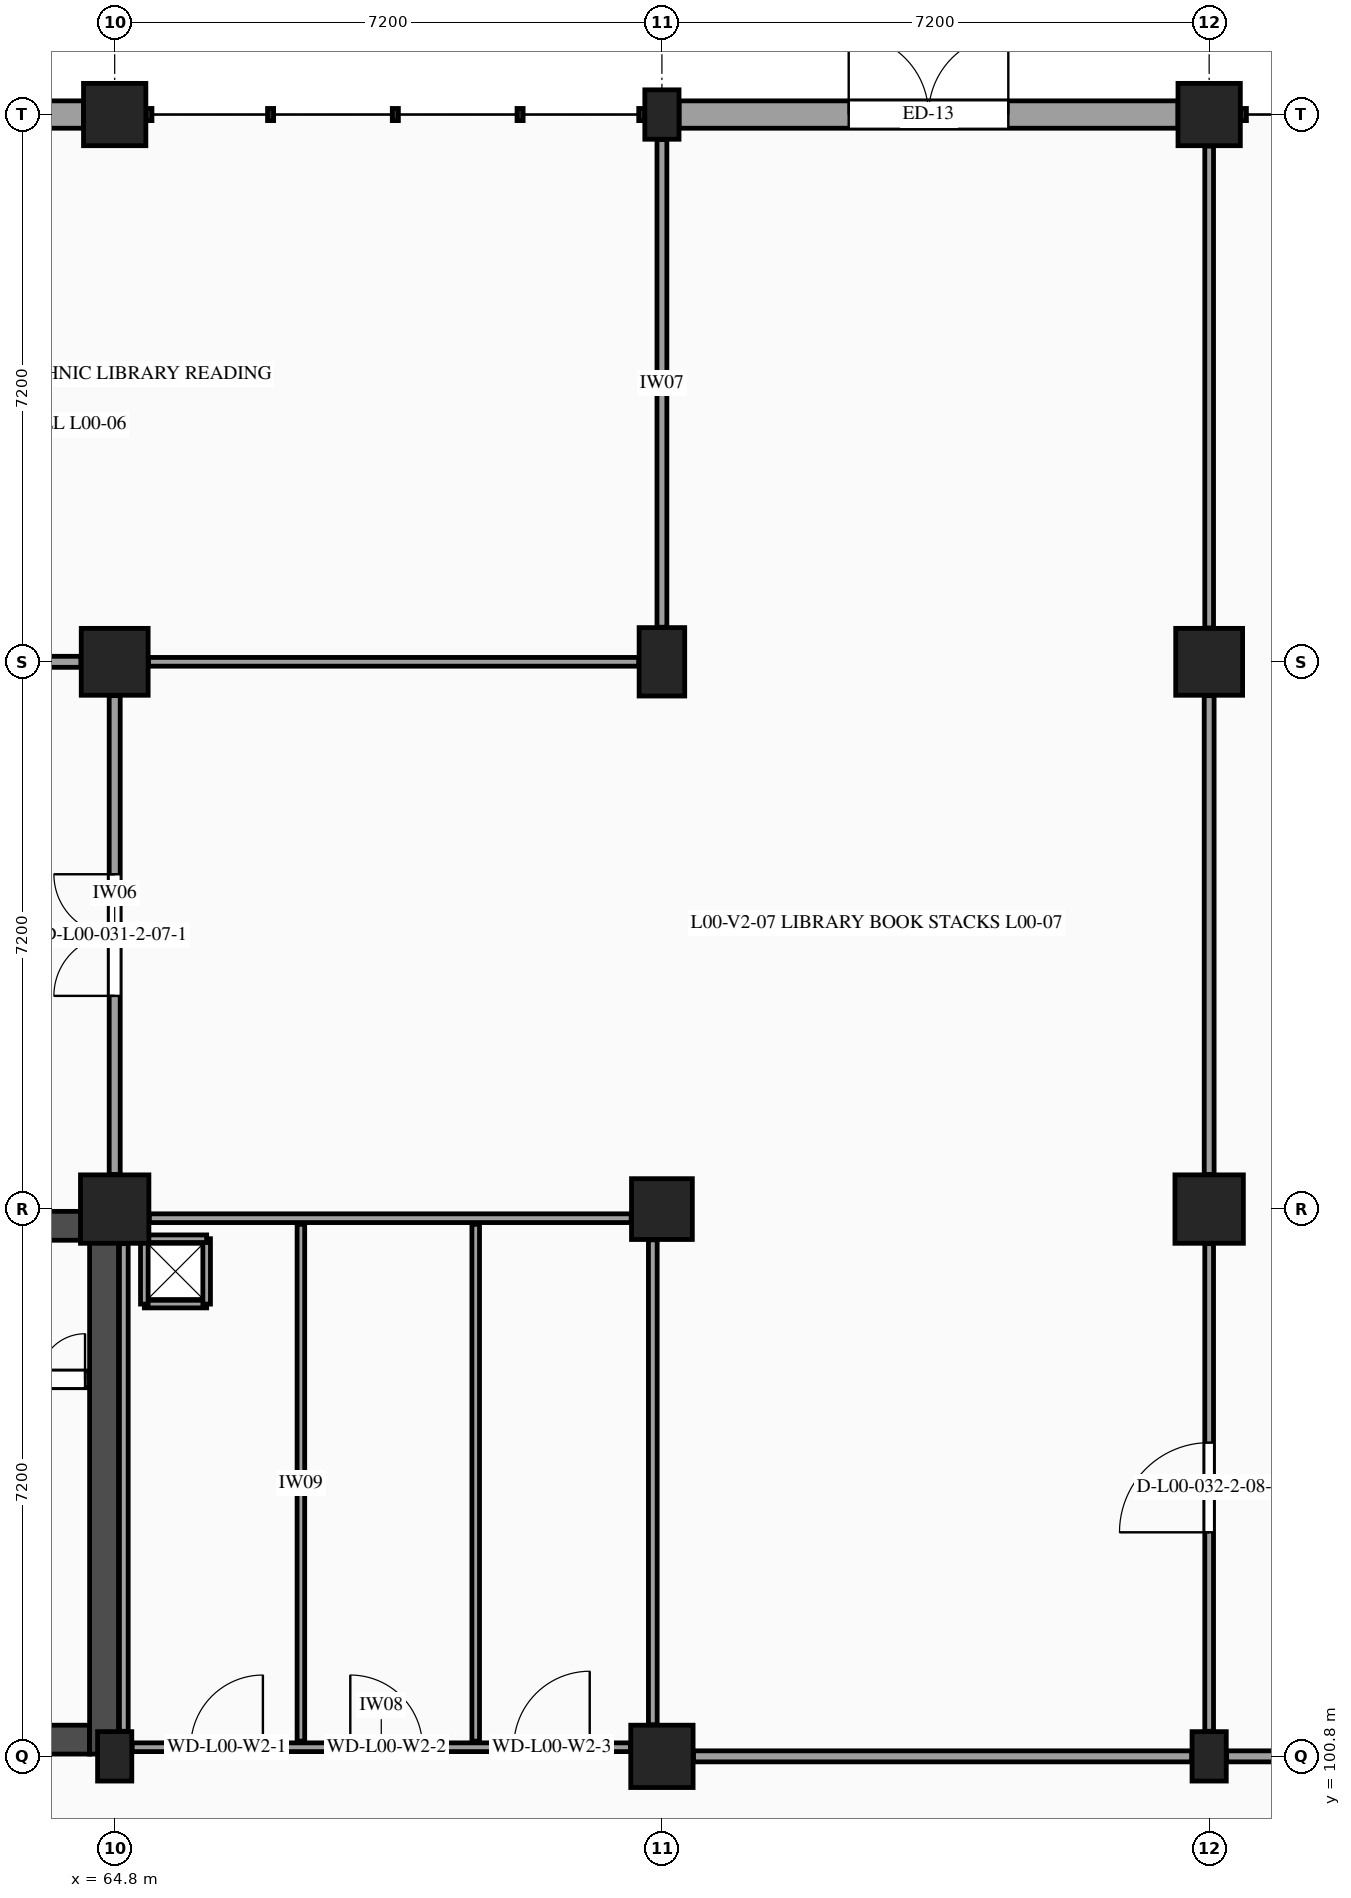
"""IFC4 building model, lengths in metres.
Left out: names, types, materials, properties, quantities, classifications, styles, units other than length and angle.
Written with IfcOpenShell. Run it as: python <this file> out.ifc"""

import sys

from ifc_helpers import new_model, si_unit, direction, frame, frame_2d, origin, origin_2d, place, context, subcontext, project, spatial, rectangle, extrude, element, fill, save


model = new_model("IFC4")
c1 = context("Model", 3, precision=1e-05, world=origin(), true_north=direction((0.0, 1.0)))
c2 = subcontext(c1, "Body", "Model", "MODEL_VIEW")
j1 = project(units=[si_unit("LENGTHUNIT", "METRE"), si_unit("PLANEANGLEUNIT", "RADIAN")], contexts=[c1])
p1 = place(None, origin())
s1 = spatial("IfcSite", under=j1, at=p1, CompositionType="ELEMENT")
p2 = place(p1, origin())
s2 = spatial("IfcBuilding", under=s1, at=p2, CompositionType="ELEMENT")
p3 = place(p2, origin())
s3 = spatial("IfcBuildingStorey", under=s2, at=p3, CompositionType="ELEMENT", Elevation=0.0)
p4 = place(p3, frame((64.8, 100.8, 0.0), z_axis=(0.0, 0.0, 1.0), x_axis=(1.0, 0.0, 0.0)))
e1 = element("IfcColumn", 1, at=p4, inside=s3, PredefinedType="PILASTER", context=c2, shape_type="SweptSolid", body=[
    extrude(rectangle(XDim=0.45, YDim=0.65, at=origin_2d()), origin(), (0.0, 0.0, 1.0), 5.4),
])
p5 = place(p3, frame((64.8, 108.0, 0.0), z_axis=(0.0, 0.0, 1.0), x_axis=(1.0, 0.0, 0.0)))
e2 = element("IfcColumn", 2, at=p5, inside=s3, PredefinedType="COLUMN", context=c2, shape_type="SweptSolid", body=[
    extrude(rectangle(XDim=0.9, YDim=0.9, at=origin_2d()), origin(), (0.0, 0.0, 1.0), 5.4),
])
p6 = place(p3, frame((64.8, 115.2, 0.0), z_axis=(0.0, 0.0, 1.0), x_axis=(1.0, 0.0, 0.0)))
e3 = element("IfcColumn", 3, at=p6, inside=s3, PredefinedType="COLUMN", context=c2, shape_type="SweptSolid", body=[
    extrude(rectangle(XDim=0.88, YDim=0.88, at=origin_2d()), origin(), (0.0, 0.0, 1.0), 5.4),
])
for number, where, z_axis, x_axis in (
    (4, (64.8, 122.4, 0.0), (0.0, 0.0, 1.0), (1.0, 0.0, 0.0)),
    (5, (72.0, 100.8, 0.0), (0.0, 0.0, 1.0), (1.0, 0.0, 0.0)),
):
    element("IfcColumn", number, at=place(p3, frame(where, z_axis=z_axis, x_axis=x_axis)), inside=s3, PredefinedType="COLUMN", context=c2, shape_type="SweptSolid", body=[
        extrude(rectangle(XDim=0.82, YDim=0.82, at=origin_2d()), origin(), (0.0, 0.0, 1.0), 5.4),
    ])
p7 = place(p3, frame((72.0, 108.0, 0.0), z_axis=(0.0, 0.0, 1.0), x_axis=(1.0, 0.0, 0.0)))
e6 = element("IfcColumn", 6, at=p7, inside=s3, PredefinedType="COLUMN", context=c2, shape_type="SweptSolid", body=[
    extrude(rectangle(XDim=0.8, YDim=0.8, at=origin_2d()), origin(), (0.0, 0.0, 1.0), 5.4),
])
p8 = place(p3, frame((72.0, 115.2, 0.0), z_axis=(0.0, 0.0, 1.0), x_axis=(1.0, 0.0, 0.0)))
e7 = element("IfcColumn", 7, at=p8, inside=s3, PredefinedType="COLUMN", context=c2, shape_type="SweptSolid", body=[
    extrude(rectangle(XDim=0.6, YDim=0.9, at=origin_2d()), origin(), (0.0, 0.0, 1.0), 5.4),
])
for number, where, z_axis, x_axis in (
    (8, (72.0, 122.4, 0.0), (0.0, 0.0, 1.0), (1.0, 0.0, 0.0)),
    (9, (79.2, 100.8, 0.0), (0.0, 0.0, 1.0), (1.0, 0.0, 0.0)),
):
    element("IfcColumn", number, at=place(p3, frame(where, z_axis=z_axis, x_axis=x_axis)), inside=s3, PredefinedType="PILASTER", context=c2, shape_type="SweptSolid", body=[
        extrude(rectangle(XDim=0.45, YDim=0.65, at=origin_2d()), origin(), (0.0, 0.0, 1.0), 5.4),
    ])
p9 = place(p3, frame((79.2, 108.0, 0.0), z_axis=(0.0, 0.0, 1.0), x_axis=(1.0, 0.0, 0.0)))
e10 = element("IfcColumn", 10, at=p9, inside=s3, PredefinedType="COLUMN", context=c2, shape_type="SweptSolid", body=[
    extrude(rectangle(XDim=0.9, YDim=0.9, at=origin_2d()), origin(), (0.0, 0.0, 1.0), 5.4),
])
p10 = place(p3, frame((79.2, 115.2, 0.0), z_axis=(0.0, 0.0, 1.0), x_axis=(1.0, 0.0, 0.0)))
e11 = element("IfcColumn", 11, at=p10, inside=s3, PredefinedType="COLUMN", context=c2, shape_type="SweptSolid", body=[
    extrude(rectangle(XDim=0.88, YDim=0.88, at=origin_2d()), origin(), (0.0, 0.0, 1.0), 5.4),
])
p11 = place(p3, frame((79.2, 122.4, 0.0), z_axis=(0.0, 0.0, 1.0), x_axis=(1.0, 0.0, 0.0)))
e12 = element("IfcColumn", 12, at=p11, inside=s3, PredefinedType="COLUMN", context=c2, shape_type="SweptSolid", body=[
    extrude(rectangle(XDim=0.82, YDim=0.82, at=origin_2d()), origin(), (0.0, 0.0, 1.0), 5.4),
])
p12 = place(p3, frame((57.825, 122.4, 0.0), z_axis=(0.0, 0.0, 1.0), x_axis=(1.0, 0.0, 0.0)))
e13 = element("IfcWall", 13, at=p12, inside=s3, PredefinedType="STANDARD", context=c2, shape_type="SweptSolid", body=[
    extrude(rectangle(XDim=6.565, YDim=0.36, at=frame_2d((3.282, 0.0))), origin(), (0.0, 0.0, 1.0), 4.37),
])
p13 = place(p12, frame((2.232, 0.0, 0.0)))
e14 = element("IfcOpeningElement", 14, at=p13, cuts=e13, PredefinedType="OPENING", context=c2, shape_type="SweptSolid", body=[
    extrude(rectangle(XDim=2.1, YDim=2.4, at=frame_2d((1.05, 1.2))), frame((0.0, 0.19, 0.0), z_axis=(0.0, -1.0, 0.0), x_axis=(1.0, 0.0, 0.0)), (0.0, 0.0, 1.0), 0.38),
])
p14 = place(p3, frame((72.225, 122.4, 0.0), z_axis=(0.0, 0.0, 1.0), x_axis=(1.0, 0.0, 0.0)))
e15 = element("IfcWall", 15, at=p14, inside=s3, PredefinedType="STANDARD", context=c2, shape_type="SweptSolid", body=[
    extrude(rectangle(XDim=6.565, YDim=0.36, at=frame_2d((3.282, 0.0))), origin(), (0.0, 0.0, 1.0), 4.37),
])
p15 = place(p14, frame((2.232, 0.0, 0.0)))
e16 = element("IfcOpeningElement", 16, at=p15, cuts=e15, PredefinedType="OPENING", context=c2, shape_type="SweptSolid", body=[
    extrude(rectangle(XDim=2.1, YDim=2.4, at=frame_2d((1.05, 1.2))), frame((0.0, 0.19, 0.0), z_axis=(0.0, -1.0, 0.0), x_axis=(1.0, 0.0, 0.0)), (0.0, 0.0, 1.0), 0.38),
])
p16 = place(p3, frame((58.01, 101.02, 0.0), z_axis=(0.0, 0.0, 1.0), x_axis=(1.0, 0.0, 0.0)))
e17 = element("IfcWall", 17, at=p16, inside=s3, PredefinedType="SHEAR", context=c2, shape_type="SweptSolid", body=[
    extrude(rectangle(XDim=6.46, YDim=0.38, at=frame_2d((3.23, 0.0))), origin(), (0.0, 0.0, 1.0), 5.09),
])
p17 = place(p3, frame((58.01, 107.78, 0.0), z_axis=(0.0, 0.0, 1.0), x_axis=(1.0, 0.0, 0.0)))
e18 = element("IfcWall", 18, at=p17, inside=s3, PredefinedType="SHEAR", context=c2, shape_type="SweptSolid", body=[
    extrude(rectangle(XDim=6.46, YDim=0.38, at=frame_2d((3.23, 0.0))), origin(), (0.0, 0.0, 1.0), 5.09),
])
p18 = place(p17, frame((1.42, 0.0, 0.0)))
e19 = element("IfcOpeningElement", 19, at=p18, cuts=e18, PredefinedType="OPENING", context=c2, shape_type="SweptSolid", body=[
    extrude(rectangle(XDim=0.85, YDim=2.1, at=frame_2d((0.425, 1.05))), frame((0.0, 0.2, 0.0), z_axis=(0.0, -1.0, 0.0), x_axis=(1.0, 0.0, 0.0)), (0.0, 0.0, 1.0), 0.4),
])
p19 = place(p17, frame((3.2, 0.0, 0.0)))
e20 = element("IfcOpeningElement", 20, at=p19, cuts=e18, PredefinedType="OPENING", context=c2, shape_type="SweptSolid", body=[
    extrude(rectangle(XDim=1.6, YDim=2.2, at=frame_2d((0.8, 1.1))), frame((0.0, 0.2, 0.0), z_axis=(0.0, -1.0, 0.0), x_axis=(1.0, 0.0, 0.0)), (0.0, 0.0, 1.0), 0.4),
])
p20 = place(p3, frame((58.01, 105.76, 0.0), z_axis=(0.0, 0.0, 1.0), x_axis=(1.0, 0.0, 0.0)))
e21 = element("IfcWall", 21, at=p20, inside=s3, PredefinedType="SHEAR", context=c2, shape_type="SweptSolid", body=[
    extrude(rectangle(XDim=6.46, YDim=0.22, at=frame_2d((3.23, 0.0))), origin(), (0.0, 0.0, 1.0), 5.09),
])
p21 = place(p20, frame((5.2, 0.0, 0.0)))
e22 = element("IfcOpeningElement", 22, at=p21, cuts=e21, PredefinedType="OPENING", context=c2, shape_type="SweptSolid", body=[
    extrude(rectangle(XDim=1.2, YDim=2.2, at=frame_2d((0.6, 1.1))), frame((0.0, 0.12, 0.0), z_axis=(0.0, -1.0, 0.0), x_axis=(1.0, 0.0, 0.0)), (0.0, 0.0, 1.0), 0.24),
])
p22 = place(p3, frame((64.66, 100.83, 0.0), z_axis=(0.0, 0.0, 1.0), x_axis=(0.0, 1.0, 0.0)))
e23 = element("IfcWall", 23, at=p22, inside=s3, PredefinedType="SHEAR", context=c2, shape_type="SweptSolid", body=[
    extrude(rectangle(XDim=7.14, YDim=0.38, at=frame_2d((3.57, 0.0))), origin(), (0.0, 0.0, 1.0), 5.09),
])
p23 = place(p3, frame((65.03, 100.92, 0.0), z_axis=(0.0, 0.0, 1.0), x_axis=(1.0, 0.0, 0.0)))
e24 = element("IfcWall", 24, at=p23, inside=s3, PredefinedType="PARTITIONING", context=c2, shape_type="SweptSolid", body=[
    extrude(rectangle(XDim=6.555, YDim=0.115, at=frame_2d((3.277, 0.0))), origin(), (0.0, 0.0, 1.0), 4.29),
])
p24 = place(p23, frame((0.77, 0.0, 0.0)))
e25 = element("IfcOpeningElement", 25, at=p24, cuts=e24, PredefinedType="OPENING", context=c2, shape_type="SweptSolid", body=[
    extrude(rectangle(XDim=0.95, YDim=2.1, at=frame_2d((0.475, 1.05))), frame((0.0, 0.067, 0.0), z_axis=(0.0, -1.0, 0.0), x_axis=(1.0, 0.0, 0.0)), (0.0, 0.0, 1.0), 0.135),
])
p25 = place(p23, frame((2.87, 0.0, 0.0)))
e26 = element("IfcOpeningElement", 26, at=p25, cuts=e24, PredefinedType="OPENING", context=c2, shape_type="SweptSolid", body=[
    extrude(rectangle(XDim=0.95, YDim=2.1, at=frame_2d((0.475, 1.05))), frame((0.0, 0.067, 0.0), z_axis=(0.0, -1.0, 0.0), x_axis=(1.0, 0.0, 0.0)), (0.0, 0.0, 1.0), 0.135),
])
p26 = place(p23, frame((5.02, 0.0, 0.0)))
e27 = element("IfcOpeningElement", 27, at=p26, cuts=e24, PredefinedType="OPENING", context=c2, shape_type="SweptSolid", body=[
    extrude(rectangle(XDim=1.0, YDim=2.15, at=frame_2d((0.5, 1.075))), frame((0.0, 0.067, 0.0), z_axis=(0.0, -1.0, 0.0), x_axis=(1.0, 0.0, 0.0)), (0.0, 0.0, 1.0), 0.135),
])
p27 = place(p3, frame((65.255, 107.88, 0.0), z_axis=(0.0, 0.0, 1.0), x_axis=(1.0, 0.0, 0.0)))
e28 = element("IfcWall", 28, at=p27, inside=s3, PredefinedType="PARTITIONING", context=c2, shape_type="SweptSolid", body=[
    extrude(rectangle(XDim=6.34, YDim=0.115, at=frame_2d((3.17, 0.0))), origin(), (0.0, 0.0, 1.0), 4.29),
])
p28 = place(p3, frame((64.92, 101.13, 0.0), z_axis=(0.0, 0.0, 1.0), x_axis=(0.0, 1.0, 0.0)))
e29 = element("IfcWall", 29, at=p28, inside=s3, PredefinedType="PARTITIONING", context=c2, shape_type="SweptSolid", body=[
    extrude(rectangle(XDim=6.415, YDim=0.115, at=frame_2d((3.208, 0.0))), origin(), (0.0, 0.0, 1.0), 4.455),
])
p29 = place(p3, frame((71.88, 101.215, 0.0), z_axis=(0.0, 0.0, 1.0), x_axis=(0.0, 1.0, 0.0)))
e30 = element("IfcWall", 30, at=p29, inside=s3, PredefinedType="PARTITIONING", context=c2, shape_type="SweptSolid", body=[
    extrude(rectangle(XDim=6.38, YDim=0.115, at=frame_2d((3.19, 0.0))), origin(), (0.0, 0.0, 1.0), 4.455),
])
for number, where, z_axis, x_axis in (
    (31, (67.25, 101.0, 0.0), (0.0, 0.0, 1.0), (0.0, 1.0, 0.0)),
    (32, (69.55, 101.0, 0.0), (0.0, 0.0, 1.0), (0.0, 1.0, 0.0)),
):
    element("IfcWall", number, at=place(p3, frame(where, z_axis=z_axis, x_axis=x_axis)), inside=s3, PredefinedType="PARTITIONING", context=c2, shape_type="SweptSolid", body=[
        extrude(rectangle(XDim=6.8, YDim=0.1, at=frame_2d((3.4, 0.0))), origin(), (0.0, 0.0, 1.0), 5.09),
    ])
p30 = place(p3, frame((65.19, 106.75, 0.0), z_axis=(0.0, 0.0, 1.0), x_axis=(1.0, 0.0, 0.0)))
e33 = element("IfcWall", 33, at=p30, inside=s3, PredefinedType="PARTITIONING", context=c2, shape_type="SweptSolid", body=[
    extrude(rectangle(XDim=0.82, YDim=0.1, at=frame_2d((0.41, 0.0))), origin(), (0.0, 0.0, 1.0), 5.09),
])
p31 = place(p3, frame((66.01, 106.75, 0.0), z_axis=(0.0, 0.0, 1.0), x_axis=(0.0, 1.0, 0.0)))
e34 = element("IfcWall", 34, at=p31, inside=s3, PredefinedType="PARTITIONING", context=c2, shape_type="SweptSolid", body=[
    extrude(rectangle(XDim=0.86, YDim=0.1, at=frame_2d((0.43, 0.0))), origin(), (0.0, 0.0, 1.0), 5.09),
])
p32 = place(p3, frame((66.01, 107.61, 0.0), z_axis=(0.0, 0.0, 1.0), x_axis=(-1.0, 0.0, 0.0)))
e35 = element("IfcWall", 35, at=p32, inside=s3, PredefinedType="PARTITIONING", context=c2, shape_type="SweptSolid", body=[
    extrude(rectangle(XDim=0.82, YDim=0.1, at=frame_2d((0.41, 0.0))), origin(), (0.0, 0.0, 1.0), 5.09),
])
p33 = place(p3, frame((65.19, 107.61, 0.0), z_axis=(0.0, 0.0, 1.0), x_axis=(0.0, -1.0, 0.0)))
e36 = element("IfcWall", 36, at=p33, inside=s3, PredefinedType="PARTITIONING", context=c2, shape_type="SweptSolid", body=[
    extrude(rectangle(XDim=0.86, YDim=0.1, at=frame_2d((0.43, 0.0))), origin(), (0.0, 0.0, 1.0), 5.09),
])
p34 = place(p3, frame((64.8, 108.455, 0.0), z_axis=(0.0, 0.0, 1.0), x_axis=(0.0, 1.0, 0.0)))
e37 = element("IfcWall", 37, at=p34, inside=s3, PredefinedType="PARTITIONING", context=c2, shape_type="SweptSolid", body=[
    extrude(rectangle(XDim=6.3, YDim=0.145, at=frame_2d((3.15, 0.0))), origin(), (0.0, 0.0, 1.0), 4.405),
])
p35 = place(p34, frame((2.35, 0.0, 0.0)))
e38 = element("IfcOpeningElement", 38, at=p35, cuts=e37, PredefinedType="OPENING", context=c2, shape_type="SweptSolid", body=[
    extrude(rectangle(XDim=1.6, YDim=2.2, at=frame_2d((0.8, 1.1))), frame((0.0, 0.083, 0.0), z_axis=(0.0, -1.0, 0.0), x_axis=(1.0, 0.0, 0.0)), (0.0, 0.0, 1.0), 0.165),
])
p36 = place(p3, frame((57.905, 115.2, 0.0), z_axis=(0.0, 0.0, 1.0), x_axis=(1.0, 0.0, 0.0)))
e39 = element("IfcWall", 39, at=p36, inside=s3, PredefinedType="PARTITIONING", context=c2, shape_type="SweptSolid", body=[
    extrude(rectangle(XDim=6.45, YDim=0.145, at=frame_2d((3.225, 0.0))), origin(), (0.0, 0.0, 1.0), 4.45),
])
p37 = place(p3, frame((65.245, 115.2, 0.0), z_axis=(0.0, 0.0, 1.0), x_axis=(1.0, 0.0, 0.0)))
e40 = element("IfcWall", 40, at=p37, inside=s3, PredefinedType="PARTITIONING", context=c2, shape_type="SweptSolid", body=[
    extrude(rectangle(XDim=6.45, YDim=0.115, at=frame_2d((3.225, 0.0))), origin(), (0.0, 0.0, 1.0), 4.29),
])
p38 = place(p3, frame((72.0, 115.655, 0.0), z_axis=(0.0, 0.0, 1.0), x_axis=(0.0, 1.0, 0.0)))
e41 = element("IfcWall", 41, at=p38, inside=s3, PredefinedType="PARTITIONING", context=c2, shape_type="SweptSolid", body=[
    extrude(rectangle(XDim=6.415, YDim=0.13, at=frame_2d((3.208, 0.0))), origin(), (0.0, 0.0, 1.0), 4.405),
])
p39 = place(p3, frame((72.415, 100.8, 0.0), z_axis=(0.0, 0.0, 1.0), x_axis=(1.0, 0.0, 0.0)))
e42 = element("IfcWall", 42, at=p39, inside=s3, PredefinedType="PARTITIONING", context=c2, shape_type="SweptSolid", body=[
    extrude(rectangle(XDim=6.555, YDim=0.145, at=frame_2d((3.277, 0.0))), origin(), (0.0, 0.0, 1.0), 4.31),
])
p40 = place(p3, frame((79.2, 101.13, 0.0), z_axis=(0.0, 0.0, 1.0), x_axis=(0.0, 1.0, 0.0)))
e43 = element("IfcWall", 43, at=p40, inside=s3, PredefinedType="PARTITIONING", context=c2, shape_type="SweptSolid", body=[
    extrude(rectangle(XDim=6.415, YDim=0.115, at=frame_2d((3.208, 0.0))), origin(), (0.0, 0.0, 1.0), 4.455),
])
p41 = place(p40, frame((2.617, 0.0, 0.0)))
e44 = element("IfcOpeningElement", 44, at=p41, cuts=e43, PredefinedType="OPENING", context=c2, shape_type="SweptSolid", body=[
    extrude(rectangle(XDim=1.18, YDim=2.18, at=frame_2d((0.59, 1.09))), frame((0.0, 0.067, 0.0), z_axis=(0.0, -1.0, 0.0), x_axis=(1.0, 0.0, 0.0)), (0.0, 0.0, 1.0), 0.135),
])
p42 = place(p3, frame((79.2, 108.455, 0.0), z_axis=(0.0, 0.0, 1.0), x_axis=(0.0, 1.0, 0.0)))
e45 = element("IfcWall", 45, at=p42, inside=s3, PredefinedType="PARTITIONING", context=c2, shape_type="SweptSolid", body=[
    extrude(rectangle(XDim=6.3, YDim=0.13, at=frame_2d((3.15, 0.0))), origin(), (0.0, 0.0, 1.0), 4.405),
])
p43 = place(p3, frame((79.2, 115.645, 0.0), z_axis=(0.0, 0.0, 1.0), x_axis=(0.0, 1.0, 0.0)))
e46 = element("IfcWall", 46, at=p43, inside=s3, PredefinedType="PARTITIONING", context=c2, shape_type="SweptSolid", body=[
    extrude(rectangle(XDim=6.34, YDim=0.115, at=frame_2d((3.17, 0.0))), origin(), (0.0, 0.0, 1.0), 4.405),
])
p44 = place(p3, frame((79.43, 100.8, 0.0), z_axis=(0.0, 0.0, 1.0), x_axis=(1.0, 0.0, 0.0)))
e47 = element("IfcWall", 47, at=p44, inside=s3, PredefinedType="PARTITIONING", context=c2, shape_type="SweptSolid", body=[
    extrude(rectangle(XDim=6.555, YDim=0.145, at=frame_2d((3.278, 0.0))), origin(), (0.0, 0.0, 1.0), 4.34),
])
p45 = place(p15, origin())
e48 = element("IfcDoor", 48, at=p45, inside=s3, OperationType="DOUBLE_DOOR_SINGLE_SWING", PredefinedType="DOOR", context=c2, shape_type="SweptSolid", body=[
    extrude(rectangle(XDim=2.1, YDim=2.4, at=frame_2d((1.05, 1.2))), frame((0.0, 0.025, 0.0), z_axis=(0.0, -1.0, 0.0), x_axis=(1.0, 0.0, 0.0)), (0.0, 0.0, 1.0), 0.05),
])
fill(e16, e48)
p46 = place(p21, frame((1.2, 0.0, 0.0), z_axis=(0.0, 0.0, 1.0), x_axis=(-1.0, 0.0, 0.0)))
e49 = element("IfcDoor", 49, at=p46, inside=s3, OperationType="DOUBLE_DOOR_SINGLE_SWING", PredefinedType="DOOR", context=c2, shape_type="SweptSolid", body=[
    extrude(rectangle(XDim=1.2, YDim=2.2, at=frame_2d((0.6, 1.1))), frame((0.0, 0.025, 0.0), z_axis=(0.0, -1.0, 0.0), x_axis=(1.0, 0.0, 0.0)), (0.0, 0.0, 1.0), 0.05),
])
fill(e22, e49)
p47 = place(p24, origin())
e50 = element("IfcDoor", 50, at=p47, inside=s3, OperationType="SINGLE_SWING_RIGHT", PredefinedType="DOOR", context=c2, shape_type="SweptSolid", body=[
    extrude(rectangle(XDim=0.95, YDim=2.1, at=frame_2d((0.475, 1.05))), frame((0.0, 0.025, 0.0), z_axis=(0.0, -1.0, 0.0), x_axis=(1.0, 0.0, 0.0)), (0.0, 0.0, 1.0), 0.05),
])
fill(e25, e50)
p48 = place(p25, origin())
e51 = element("IfcDoor", 51, at=p48, inside=s3, OperationType="SINGLE_SWING_LEFT", PredefinedType="DOOR", context=c2, shape_type="SweptSolid", body=[
    extrude(rectangle(XDim=0.95, YDim=2.1, at=frame_2d((0.475, 1.05))), frame((0.0, 0.025, 0.0), z_axis=(0.0, -1.0, 0.0), x_axis=(1.0, 0.0, 0.0)), (0.0, 0.0, 1.0), 0.05),
])
fill(e26, e51)
p49 = place(p26, origin())
e52 = element("IfcDoor", 52, at=p49, inside=s3, OperationType="SINGLE_SWING_RIGHT", PredefinedType="DOOR", context=c2, shape_type="SweptSolid", body=[
    extrude(rectangle(XDim=1.0, YDim=2.15, at=frame_2d((0.5, 1.075))), frame((0.0, 0.025, 0.0), z_axis=(0.0, -1.0, 0.0), x_axis=(1.0, 0.0, 0.0)), (0.0, 0.0, 1.0), 0.05),
])
fill(e27, e52)
p50 = place(p35, origin())
e53 = element("IfcDoor", 53, at=p50, inside=s3, OperationType="DOUBLE_DOOR_SINGLE_SWING", PredefinedType="DOOR", context=c2, shape_type="SweptSolid", body=[
    extrude(rectangle(XDim=1.6, YDim=2.2, at=frame_2d((0.8, 1.1))), frame((0.0, 0.025, 0.0), z_axis=(0.0, -1.0, 0.0), x_axis=(1.0, 0.0, 0.0)), (0.0, 0.0, 1.0), 0.05),
])
fill(e38, e53)
p51 = place(p41, origin())
e54 = element("IfcDoor", 54, at=p51, inside=s3, OperationType="SINGLE_SWING_LEFT", PredefinedType="DOOR", context=c2, shape_type="SweptSolid", body=[
    extrude(rectangle(XDim=1.18, YDim=2.18, at=frame_2d((0.59, 1.09))), frame((0.0, 0.025, 0.0), z_axis=(0.0, -1.0, 0.0), x_axis=(1.0, 0.0, 0.0)), (0.0, 0.0, 1.0), 0.05),
])
fill(e44, e54)
save(model, sys.argv[1])
